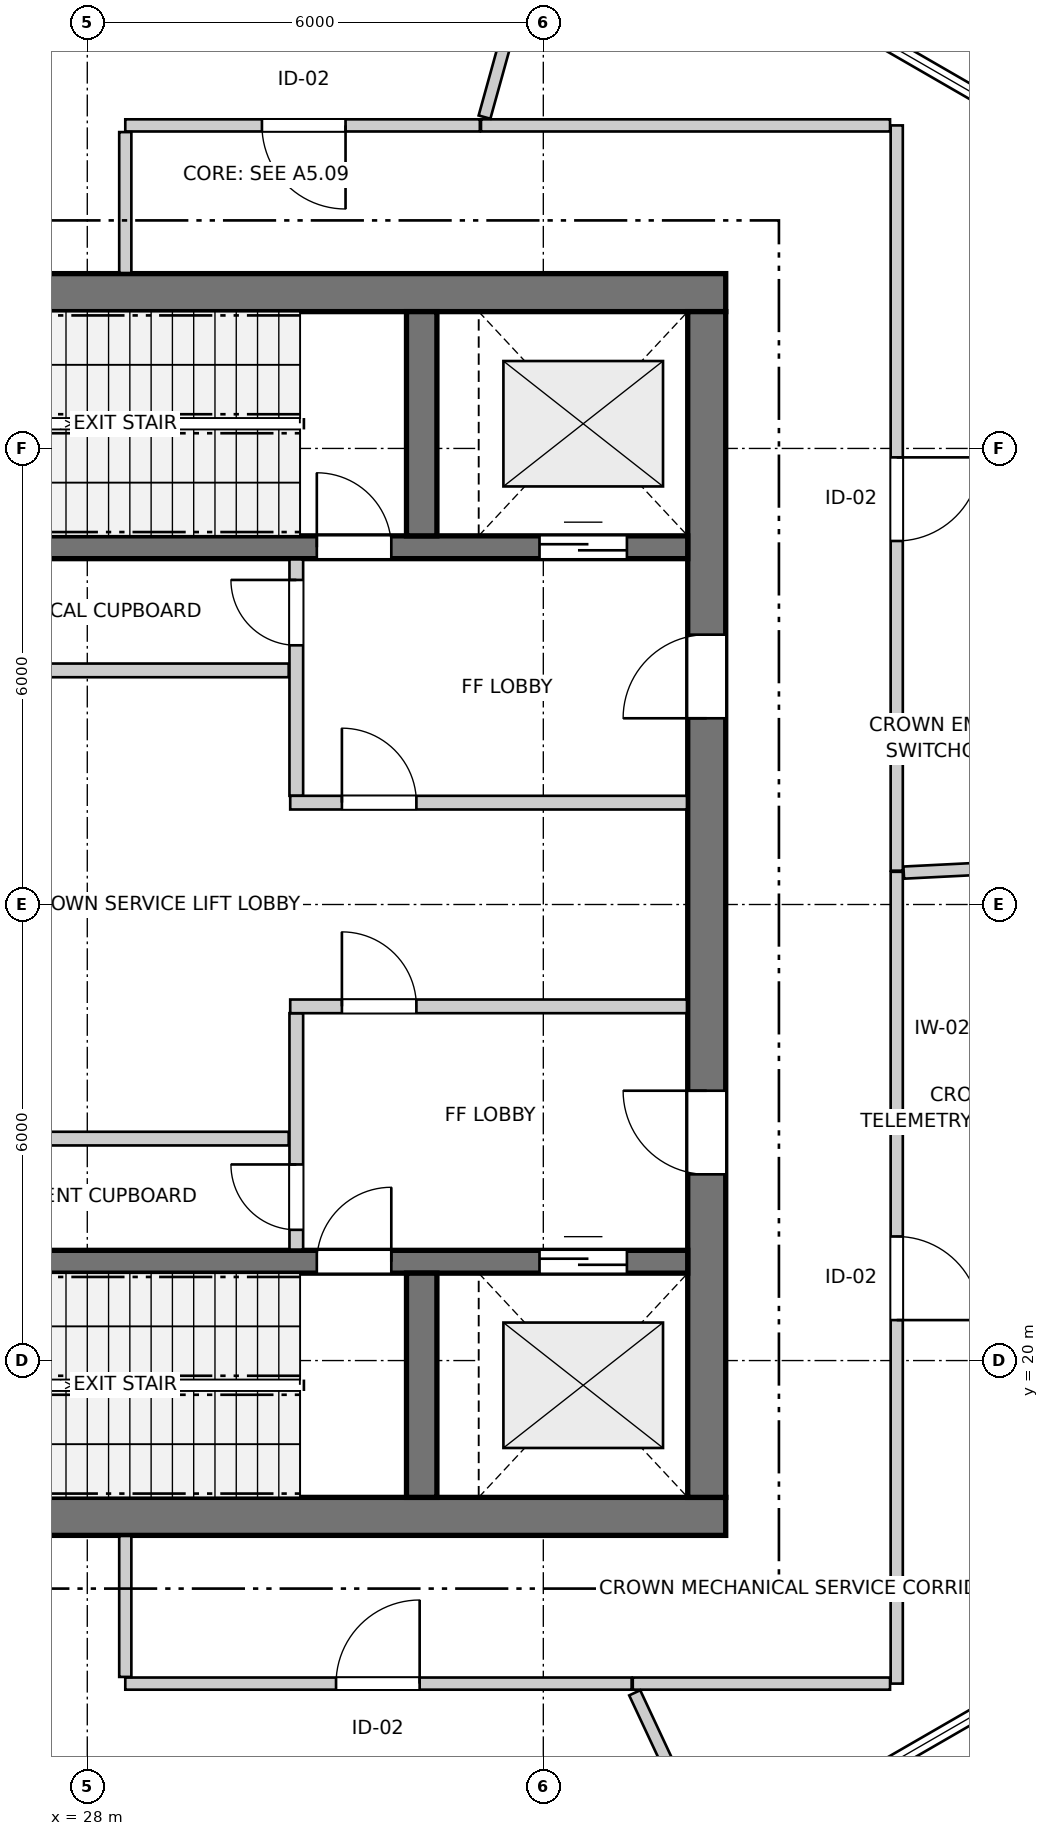
"""IFC4 building model, lengths in metres.
Left out: names, types, materials, properties, quantities, classifications, styles, units other than length and angle.
Written with IfcOpenShell. Run it as: python <this file> out.ifc"""

import sys

from ifc_helpers import new_model, si_unit, direction, frame, frame_2d, origin, place, context, subcontext, project, spatial, rectangle, extrude, source, transform, mapped, element, fill, save


model = new_model("IFC4")
c1 = context("Model", 3, precision=1e-05, world=origin(), true_north=direction((0.0, 1.0)))
c2 = subcontext(c1, "Body", "Model", "MODEL_VIEW")
j1 = project(units=[si_unit("LENGTHUNIT", "METRE"), si_unit("PLANEANGLEUNIT", "RADIAN")], contexts=[c1])
p1 = place(None, origin())
s1 = spatial("IfcSite", under=j1, at=p1, CompositionType="ELEMENT")
p2 = place(p1, origin())
s2 = spatial("IfcBuilding", under=s1, at=p2, CompositionType="ELEMENT")
p3 = place(p2, frame((0.0, 0.0, 270.4)))
s3 = spatial("IfcBuildingStorey", under=s2, at=p3, CompositionType="ELEMENT", Elevation=270.4)
for number, where, z_axis, x_axis in (
    (1, (24.3, 17.95, 0.0), (0.0, 0.0, 1.0), (1.0, 0.0, 0.0)),
    (2, (36.4, 34.05, 0.0), (0.0, 0.0, 1.0), (-1.0, 0.0, 0.0)),
):
    element("IfcWall", number, at=place(p3, frame(where, z_axis=z_axis, x_axis=x_axis)), inside=s3, PredefinedType="SHEAR", context=c2, shape_type="SweptSolid", body=[
        extrude(rectangle(XDim=12.1, YDim=0.5, at=frame_2d((6.05, 0.0))), origin(), (0.0, 0.0, 1.0), 4.05),
    ])
p4 = place(p3, frame((36.15, 18.2, 0.0), z_axis=(0.0, 0.0, 1.0), x_axis=(0.0, 1.0, 0.0)))
e3 = element("IfcWall", 3, at=p4, inside=s3, PredefinedType="SHEAR", context=c2, shape_type="SweptSolid", body=[
    extrude(rectangle(XDim=15.6, YDim=0.5, at=frame_2d((7.8, 0.0))), origin(), (0.0, 0.0, 1.0), 4.05),
])
p5 = place(p4, frame((4.25, 0.0, 0.0)))
e4 = element("IfcOpeningElement", 4, at=p5, cuts=e3, PredefinedType="OPENING", context=c2, shape_type="SweptSolid", body=[
    extrude(rectangle(XDim=1.1, YDim=2.15, at=frame_2d((0.55, 1.075))), frame((0.0, 0.26, 0.0), z_axis=(0.0, -1.0, 0.0), x_axis=(1.0, 0.0, 0.0)), (0.0, 0.0, 1.0), 0.52),
])
p6 = place(p4, frame((10.25, 0.0, 0.0)))
e5 = element("IfcOpeningElement", 5, at=p6, cuts=e3, PredefinedType="OPENING", context=c2, shape_type="SweptSolid", body=[
    extrude(rectangle(XDim=1.1, YDim=2.15, at=frame_2d((0.55, 1.075))), frame((0.0, 0.26, 0.0), z_axis=(0.0, -1.0, 0.0), x_axis=(1.0, 0.0, 0.0)), (0.0, 0.0, 1.0), 0.52),
])
p7 = place(p3, frame((24.8, 21.3, 0.0), z_axis=(0.0, 0.0, 1.0), x_axis=(1.0, 0.0, 0.0)))
e6 = element("IfcWall", 6, at=p7, inside=s3, PredefinedType="SHEAR", context=c2, shape_type="SweptSolid", body=[
    extrude(rectangle(XDim=11.1, YDim=0.3, at=frame_2d((5.55, 0.0))), origin(), (0.0, 0.0, 1.0), 4.05),
])
p8 = place(p7, frame((6.22, 0.0, 0.0)))
e7 = element("IfcOpeningElement", 7, at=p8, cuts=e6, PredefinedType="OPENING", context=c2, shape_type="SweptSolid", body=[
    extrude(rectangle(XDim=0.98, YDim=2.15, at=frame_2d((0.49, 1.075))), frame((0.0, 0.16, 0.0), z_axis=(0.0, -1.0, 0.0), x_axis=(1.0, 0.0, 0.0)), (0.0, 0.0, 1.0), 0.32),
])
p9 = place(p7, frame((9.15, 0.0, 0.0)))
e8 = element("IfcOpeningElement", 8, at=p9, cuts=e6, PredefinedType="OPENING", context=c2, shape_type="SweptSolid", body=[
    extrude(rectangle(XDim=1.15, YDim=2.15, at=frame_2d((0.575, 1.075))), frame((0.0, 0.16, 0.0), z_axis=(0.0, -1.0, 0.0), x_axis=(1.0, 0.0, 0.0)), (0.0, 0.0, 1.0), 0.32),
])
p10 = place(p3, frame((32.4, 18.2, 0.0), z_axis=(0.0, 0.0, 1.0), x_axis=(0.0, 1.0, 0.0)))
e9 = element("IfcWall", 9, at=p10, inside=s3, PredefinedType="SHEAR", context=c2, shape_type="SweptSolid", body=[
    extrude(rectangle(XDim=2.95, YDim=0.4, at=frame_2d((1.475, 0.0))), origin(), (0.0, 0.0, 1.0), 4.05),
])
p11 = place(p3, frame((24.8, 30.7, 0.0), z_axis=(0.0, 0.0, 1.0), x_axis=(1.0, 0.0, 0.0)))
e10 = element("IfcWall", 10, at=p11, inside=s3, PredefinedType="SHEAR", context=c2, shape_type="SweptSolid", body=[
    extrude(rectangle(XDim=11.1, YDim=0.3, at=frame_2d((5.55, 0.0))), origin(), (0.0, 0.0, 1.0), 4.05),
])
p12 = place(p11, frame((6.22, 0.0, 0.0)))
e11 = element("IfcOpeningElement", 11, at=p12, cuts=e10, PredefinedType="OPENING", context=c2, shape_type="SweptSolid", body=[
    extrude(rectangle(XDim=0.98, YDim=2.15, at=frame_2d((0.49, 1.075))), frame((0.0, 0.16, 0.0), z_axis=(0.0, -1.0, 0.0), x_axis=(1.0, 0.0, 0.0)), (0.0, 0.0, 1.0), 0.32),
])
p13 = place(p11, frame((9.15, 0.0, 0.0)))
e12 = element("IfcOpeningElement", 12, at=p13, cuts=e10, PredefinedType="OPENING", context=c2, shape_type="SweptSolid", body=[
    extrude(rectangle(XDim=1.15, YDim=2.15, at=frame_2d((0.575, 1.075))), frame((0.0, 0.16, 0.0), z_axis=(0.0, -1.0, 0.0), x_axis=(1.0, 0.0, 0.0)), (0.0, 0.0, 1.0), 0.32),
])
p14 = place(p3, frame((32.4, 30.85, 0.0), z_axis=(0.0, 0.0, 1.0), x_axis=(0.0, 1.0, 0.0)))
e13 = element("IfcWall", 13, at=p14, inside=s3, PredefinedType="SHEAR", context=c2, shape_type="SweptSolid", body=[
    extrude(rectangle(XDim=2.95, YDim=0.4, at=frame_2d((1.475, 0.0))), origin(), (0.0, 0.0, 1.0), 4.05),
])
p15 = place(p3, frame((30.75, 21.46, 0.0), z_axis=(0.0, 0.0, 1.0), x_axis=(0.0, 1.0, 0.0)))
e14 = element("IfcWall", 14, at=p15, inside=s3, PredefinedType="PARTITIONING", context=c2, shape_type="SweptSolid", body=[
    extrude(rectangle(XDim=3.11, YDim=0.18, at=frame_2d((1.555, 0.0))), origin(), (0.0, 0.0, 1.0), 4.05),
])
p16 = place(p15, frame((0.26, 0.0, 0.0)))
e15 = element("IfcOpeningElement", 15, at=p16, cuts=e14, PredefinedType="OPENING", context=c2, shape_type="SweptSolid", body=[
    extrude(rectangle(XDim=0.86, YDim=2.05, at=frame_2d((0.43, 1.025))), frame((0.0, 0.1, 0.0), z_axis=(0.0, -1.0, 0.0), x_axis=(1.0, 0.0, 0.0)), (0.0, 0.0, 1.0), 0.2),
])
p17 = place(p3, frame((30.67, 24.66, 0.0), z_axis=(0.0, 0.0, 1.0), x_axis=(1.0, 0.0, 0.0)))
e16 = element("IfcWall", 16, at=p17, inside=s3, PredefinedType="PARTITIONING", context=c2, shape_type="SweptSolid", body=[
    extrude(rectangle(XDim=5.22, YDim=0.18, at=frame_2d((2.61, 0.0))), origin(), (0.0, 0.0, 1.0), 4.05),
])
p18 = place(p17, frame((0.68, 0.0, 0.0)))
e17 = element("IfcOpeningElement", 17, at=p18, cuts=e16, PredefinedType="OPENING", context=c2, shape_type="SweptSolid", body=[
    extrude(rectangle(XDim=0.98, YDim=2.15, at=frame_2d((0.49, 1.075))), frame((0.0, 0.1, 0.0), z_axis=(0.0, -1.0, 0.0), x_axis=(1.0, 0.0, 0.0)), (0.0, 0.0, 1.0), 0.2),
])
p19 = place(p3, frame((30.75, 27.43, 0.0), z_axis=(0.0, 0.0, 1.0), x_axis=(0.0, 1.0, 0.0)))
e18 = element("IfcWall", 18, at=p19, inside=s3, PredefinedType="PARTITIONING", context=c2, shape_type="SweptSolid", body=[
    extrude(rectangle(XDim=3.11, YDim=0.18, at=frame_2d((1.555, 0.0))), origin(), (0.0, 0.0, 1.0), 4.05),
])
p20 = place(p19, frame((1.98, 0.0, 0.0)))
e19 = element("IfcOpeningElement", 19, at=p20, cuts=e18, PredefinedType="OPENING", context=c2, shape_type="SweptSolid", body=[
    extrude(rectangle(XDim=0.86, YDim=2.05, at=frame_2d((0.43, 1.025))), frame((0.0, 0.1, 0.0), z_axis=(0.0, -1.0, 0.0), x_axis=(1.0, 0.0, 0.0)), (0.0, 0.0, 1.0), 0.2),
])
p21 = place(p3, frame((30.67, 27.34, 0.0), z_axis=(0.0, 0.0, 1.0), x_axis=(1.0, 0.0, 0.0)))
e20 = element("IfcWall", 20, at=p21, inside=s3, PredefinedType="PARTITIONING", context=c2, shape_type="SweptSolid", body=[
    extrude(rectangle(XDim=5.22, YDim=0.18, at=frame_2d((2.61, 0.0))), origin(), (0.0, 0.0, 1.0), 4.05),
])
p22 = place(p21, frame((0.68, 0.0, 0.0)))
e21 = element("IfcOpeningElement", 21, at=p22, cuts=e20, PredefinedType="OPENING", context=c2, shape_type="SweptSolid", body=[
    extrude(rectangle(XDim=0.98, YDim=2.15, at=frame_2d((0.49, 1.075))), frame((0.0, 0.1, 0.0), z_axis=(0.0, -1.0, 0.0), x_axis=(1.0, 0.0, 0.0)), (0.0, 0.0, 1.0), 0.2),
])
for number, where, z_axis, x_axis in (
    (22, (24.81, 22.92, 0.0), (0.0, 0.0, 1.0), (1.0, 0.0, 0.0)),
    (23, (24.81, 29.08, 0.0), (0.0, 0.0, 1.0), (1.0, 0.0, 0.0)),
):
    element("IfcWall", number, at=place(p3, frame(where, z_axis=z_axis, x_axis=x_axis)), inside=s3, PredefinedType="PARTITIONING", context=c2, shape_type="SweptSolid", body=[
        extrude(rectangle(XDim=5.84, YDim=0.18, at=frame_2d((2.92, 0.0))), origin(), (0.0, 0.0, 1.0), 4.05),
    ])
p23 = place(p3, frame((38.65, 26.43, 0.0), z_axis=(0.0, 0.0, 1.0), x_axis=(0.0, -1.0, 0.0)))
e24 = element("IfcWall", 24, at=p23, inside=s3, PredefinedType="PARTITIONING", context=c2, shape_type="SweptSolid", body=[
    extrude(rectangle(XDim=10.68, YDim=0.16, at=frame_2d((5.34, 0.0))), origin(), (0.0, 0.0, 1.0), 4.05),
])
p24 = place(p23, frame((4.798, 0.0, 0.0)))
e25 = element("IfcOpeningElement", 25, at=p24, cuts=e24, PredefinedType="OPENING", context=c2, shape_type="SweptSolid", body=[
    extrude(rectangle(XDim=1.1, YDim=2.15, at=frame_2d((0.55, 1.075))), frame((0.0, 0.09, 0.0), z_axis=(0.0, -1.0, 0.0), x_axis=(1.0, 0.0, 0.0)), (0.0, 0.0, 1.0), 0.18),
])
p25 = place(p3, frame((38.65, 36.25, 0.0), z_axis=(0.0, 0.0, 1.0), x_axis=(0.0, -1.0, 0.0)))
e26 = element("IfcWall", 26, at=p25, inside=s3, PredefinedType="PARTITIONING", context=c2, shape_type="SweptSolid", body=[
    extrude(rectangle(XDim=9.805, YDim=0.16, at=frame_2d((4.902, 0.0))), origin(), (0.0, 0.0, 1.0), 4.05),
])
p26 = place(p25, frame((4.367, 0.0, 0.0)))
e27 = element("IfcOpeningElement", 27, at=p26, cuts=e26, PredefinedType="OPENING", context=c2, shape_type="SweptSolid", body=[
    extrude(rectangle(XDim=1.1, YDim=2.15, at=frame_2d((0.55, 1.075))), frame((0.0, 0.09, 0.0), z_axis=(0.0, -1.0, 0.0), x_axis=(1.0, 0.0, 0.0)), (0.0, 0.0, 1.0), 0.18),
])
p27 = place(p3, frame((28.5, 15.75, 0.0), z_axis=(0.0, 0.0, 1.0), x_axis=(1.0, 0.0, 0.0)))
e28 = element("IfcWall", 28, at=p27, inside=s3, PredefinedType="PARTITIONING", context=c2, shape_type="SweptSolid", body=[
    extrude(rectangle(XDim=6.662, YDim=0.16, at=frame_2d((3.331, 0.0))), origin(), (0.0, 0.0, 1.0), 4.05),
])
p28 = place(p27, frame((2.773, 0.0, 0.0)))
e29 = element("IfcOpeningElement", 29, at=p28, cuts=e28, PredefinedType="OPENING", context=c2, shape_type="SweptSolid", body=[
    extrude(rectangle(XDim=1.1, YDim=2.15, at=frame_2d((0.55, 1.075))), frame((0.0, 0.09, 0.0), z_axis=(0.0, -1.0, 0.0), x_axis=(1.0, 0.0, 0.0)), (0.0, 0.0, 1.0), 0.18),
])
p29 = place(p3, frame((33.165, 36.25, 0.0), z_axis=(0.0, 0.0, 1.0), x_axis=(-1.0, 0.0, 0.0)))
e30 = element("IfcWall", 30, at=p29, inside=s3, PredefinedType="PARTITIONING", context=c2, shape_type="SweptSolid", body=[
    extrude(rectangle(XDim=4.665, YDim=0.16, at=frame_2d((2.333, 0.0))), origin(), (0.0, 0.0, 1.0), 4.05),
])
p30 = place(p29, frame((1.767, 0.0, 0.0)))
e31 = element("IfcOpeningElement", 31, at=p30, cuts=e30, PredefinedType="OPENING", context=c2, shape_type="SweptSolid", body=[
    extrude(rectangle(XDim=1.1, YDim=2.15, at=frame_2d((0.55, 1.075))), frame((0.0, 0.09, 0.0), z_axis=(0.0, -1.0, 0.0), x_axis=(1.0, 0.0, 0.0)), (0.0, 0.0, 1.0), 0.18),
])
p31 = place(p3, frame((33.18, 36.25, 0.0), z_axis=(0.0, 0.0, 1.0), x_axis=(1.0, 0.0, 0.0)))
e32 = element("IfcWall", 32, at=p31, inside=s3, PredefinedType="PARTITIONING", context=c2, shape_type="SweptSolid", body=[
    extrude(rectangle(XDim=5.382, YDim=0.16, at=frame_2d((2.691, 0.0))), origin(), (0.0, 0.0, 1.0), 4.05),
])
p32 = place(p3, frame((33.226, 36.359, 0.0), z_axis=(0.0, 0.0, 1.0), x_axis=(0.267305613855, 0.963611803997, 0.0)))
e33 = element("IfcWall", 33, at=p32, inside=s3, PredefinedType="PARTITIONING", context=c2, shape_type="SweptSolid", body=[
    extrude(rectangle(XDim=3.574, YDim=0.16, at=frame_2d((1.787, 0.0))), origin(), (0.0, 0.0, 1.0), 3.318),
])
p33 = place(p3, frame((35.177, 15.75, 0.0), z_axis=(0.0, 0.0, 1.0), x_axis=(1.0, 0.0, 0.0)))
e34 = element("IfcWall", 34, at=p33, inside=s3, PredefinedType="PARTITIONING", context=c2, shape_type="SweptSolid", body=[
    extrude(rectangle(XDim=3.385, YDim=0.16, at=frame_2d((1.692, 0.0))), origin(), (0.0, 0.0, 1.0), 4.05),
])
p34 = place(p3, frame((38.742, 26.42, 0.0), z_axis=(0.0, 0.0, 1.0), x_axis=(0.998740431648, 0.050175194976, 0.0)))
e35 = element("IfcWall", 35, at=p34, inside=s3, PredefinedType="PARTITIONING", context=c2, shape_type="SweptSolid", body=[
    extrude(rectangle(XDim=3.075, YDim=0.16, at=frame_2d((1.538, 0.0))), origin(), (0.0, 0.0, 1.0), 4.05),
])
p35 = place(p3, frame((35.203, 15.629, 0.0), z_axis=(0.0, 0.0, 1.0), x_axis=(0.423577860937, -0.905859699801, 0.0)))
e36 = element("IfcWall", 36, at=p35, inside=s3, PredefinedType="PARTITIONING", context=c2, shape_type="SweptSolid", body=[
    extrude(rectangle(XDim=2.47, YDim=0.16, at=frame_2d((1.235, 0.0))), origin(), (0.0, 0.0, 1.0), 4.05),
])
for number, where, z_axis, x_axis in (
    (37, (28.5, 34.308, 0.0), (0.0, 0.0, 1.0), (0.0, 1.0, 0.0)),
    (38, (28.5, 15.838, 0.0), (0.0, 0.0, 1.0), (0.0, 1.0, 0.0)),
):
    element("IfcWall", number, at=place(p3, frame(where, z_axis=z_axis, x_axis=x_axis)), inside=s3, PredefinedType="PARTITIONING", context=c2, shape_type="SweptSolid", body=[
        extrude(rectangle(XDim=1.854, YDim=0.16, at=frame_2d((0.927, 0.0))), origin(), (0.0, 0.0, 1.0), 3.318),
    ])
m1 = source(origin(), c2, "Body", "SweptSolid", [
    extrude(rectangle(XDim=0.98, YDim=2.15, at=frame_2d((0.49, 1.075))), frame((0.0, 0.025, 0.0), z_axis=(0.0, -1.0, 0.0), x_axis=(1.0, 0.0, 0.0)), (0.0, 0.0, 1.0), 0.05),
])
p36 = place(p8, origin())
e39 = element("IfcDoor", 39, at=p36, inside=s3, OperationType="SINGLE_SWING_RIGHT", PredefinedType="DOOR", context=c2, shape_type="MappedRepresentation", body=[
    mapped(m1, transform((0.0, 0.0, 0.0), x_axis=(1.0, 0.0, 0.0), y_axis=(0.0, 1.0, 0.0), z_axis=(0.0, 0.0, 1.0), scale=1.0)),
])
fill(e7, e39)
m2 = source(origin(), c2, "Body", "SweptSolid", [
    extrude(rectangle(XDim=1.15, YDim=2.15, at=frame_2d((0.575, 1.075))), frame((0.0, 0.025, 0.0), z_axis=(0.0, -1.0, 0.0), x_axis=(1.0, 0.0, 0.0)), (0.0, 0.0, 1.0), 0.05),
])
p37 = place(p9, origin())
e40 = element("IfcDoor", 40, at=p37, inside=s3, OperationType="DOUBLE_DOOR_SLIDING", PredefinedType="DOOR", context=c2, shape_type="MappedRepresentation", body=[
    mapped(m2, transform((0.0, 0.0, 0.0), x_axis=(1.0, 0.0, 0.0), y_axis=(0.0, 1.0, 0.0), z_axis=(0.0, 0.0, 1.0), scale=1.0)),
])
fill(e8, e40)
p38 = place(p12, origin())
e41 = element("IfcDoor", 41, at=p38, inside=s3, OperationType="SINGLE_SWING_LEFT", PredefinedType="DOOR", context=c2, shape_type="MappedRepresentation", body=[
    mapped(m1, transform((0.0, 0.0, 0.0), x_axis=(1.0, 0.0, 0.0), y_axis=(0.0, 1.0, 0.0), z_axis=(0.0, 0.0, 1.0), scale=1.0)),
])
fill(e11, e41)
p39 = place(p13, origin())
e42 = element("IfcDoor", 42, at=p39, inside=s3, OperationType="DOUBLE_DOOR_SLIDING", PredefinedType="DOOR", context=c2, shape_type="MappedRepresentation", body=[
    mapped(m2, transform((0.0, 0.0, 0.0), x_axis=(1.0, 0.0, 0.0), y_axis=(0.0, 1.0, 0.0), z_axis=(0.0, 0.0, 1.0), scale=1.0)),
])
fill(e12, e42)
m3 = source(origin(), c2, "Body", "SweptSolid", [
    extrude(rectangle(XDim=1.1, YDim=2.15, at=frame_2d((0.55, 1.075))), frame((0.0, 0.025, 0.0), z_axis=(0.0, -1.0, 0.0), x_axis=(1.0, 0.0, 0.0)), (0.0, 0.0, 1.0), 0.05),
])
p40 = place(p5, origin())
e43 = element("IfcDoor", 43, at=p40, inside=s3, OperationType="SINGLE_SWING_RIGHT", PredefinedType="DOOR", context=c2, shape_type="MappedRepresentation", body=[
    mapped(m3, transform((0.0, 0.0, 0.0), x_axis=(1.0, 0.0, 0.0), y_axis=(0.0, 1.0, 0.0), z_axis=(0.0, 0.0, 1.0), scale=1.0)),
])
fill(e4, e43)
p41 = place(p6, origin())
e44 = element("IfcDoor", 44, at=p41, inside=s3, OperationType="SINGLE_SWING_LEFT", PredefinedType="DOOR", context=c2, shape_type="MappedRepresentation", body=[
    mapped(m3, transform((0.0, 0.0, 0.0), x_axis=(1.0, 0.0, 0.0), y_axis=(0.0, 1.0, 0.0), z_axis=(0.0, 0.0, 1.0), scale=1.0)),
])
fill(e5, e44)
m4 = source(origin(), c2, "Body", "SweptSolid", [
    extrude(rectangle(XDim=0.86, YDim=2.05, at=frame_2d((0.43, 1.025))), frame((0.0, 0.025, 0.0), z_axis=(0.0, -1.0, 0.0), x_axis=(1.0, 0.0, 0.0)), (0.0, 0.0, 1.0), 0.05),
])
p42 = place(p16, origin())
e45 = element("IfcDoor", 45, at=p42, inside=s3, OperationType="SINGLE_SWING_RIGHT", PredefinedType="DOOR", context=c2, shape_type="MappedRepresentation", body=[
    mapped(m4, transform((0.0, 0.0, 0.0), x_axis=(1.0, 0.0, 0.0), y_axis=(0.0, 1.0, 0.0), z_axis=(0.0, 0.0, 1.0), scale=1.0)),
])
fill(e15, e45)
p43 = place(p18, origin())
e46 = element("IfcDoor", 46, at=p43, inside=s3, OperationType="SINGLE_SWING_LEFT", PredefinedType="DOOR", context=c2, shape_type="MappedRepresentation", body=[
    mapped(m1, transform((0.0, 0.0, 0.0), x_axis=(1.0, 0.0, 0.0), y_axis=(0.0, 1.0, 0.0), z_axis=(0.0, 0.0, 1.0), scale=1.0)),
])
fill(e17, e46)
p44 = place(p20, origin())
e47 = element("IfcDoor", 47, at=p44, inside=s3, OperationType="SINGLE_SWING_RIGHT", PredefinedType="DOOR", context=c2, shape_type="MappedRepresentation", body=[
    mapped(m4, transform((0.0, 0.0, 0.0), x_axis=(1.0, 0.0, 0.0), y_axis=(0.0, 1.0, 0.0), z_axis=(0.0, 0.0, 1.0), scale=1.0)),
])
fill(e19, e47)
p45 = place(p22, origin())
e48 = element("IfcDoor", 48, at=p45, inside=s3, OperationType="SINGLE_SWING_LEFT", PredefinedType="DOOR", context=c2, shape_type="MappedRepresentation", body=[
    mapped(m1, transform((0.0, 0.0, 0.0), x_axis=(1.0, 0.0, 0.0), y_axis=(0.0, 1.0, 0.0), z_axis=(0.0, 0.0, 1.0), scale=1.0)),
])
fill(e21, e48)
p46 = place(p24, origin())
e49 = element("IfcDoor", 49, at=p46, inside=s3, OperationType="SINGLE_SWING_RIGHT", PredefinedType="DOOR", context=c2, shape_type="MappedRepresentation", body=[
    mapped(m3, transform((0.0, 0.0, 0.0), x_axis=(1.0, 0.0, 0.0), y_axis=(0.0, 1.0, 0.0), z_axis=(0.0, 0.0, 1.0), scale=1.0)),
])
fill(e25, e49)
p47 = place(p26, origin())
e50 = element("IfcDoor", 50, at=p47, inside=s3, OperationType="SINGLE_SWING_LEFT", PredefinedType="DOOR", context=c2, shape_type="MappedRepresentation", body=[
    mapped(m3, transform((0.0, 0.0, 0.0), x_axis=(1.0, 0.0, 0.0), y_axis=(0.0, 1.0, 0.0), z_axis=(0.0, 0.0, 1.0), scale=1.0)),
])
fill(e27, e50)
p48 = place(p28, origin())
e51 = element("IfcDoor", 51, at=p48, inside=s3, OperationType="SINGLE_SWING_RIGHT", PredefinedType="DOOR", context=c2, shape_type="MappedRepresentation", body=[
    mapped(m3, transform((0.0, 0.0, 0.0), x_axis=(1.0, 0.0, 0.0), y_axis=(0.0, 1.0, 0.0), z_axis=(0.0, 0.0, 1.0), scale=1.0)),
])
fill(e29, e51)
p49 = place(p30, origin())
e52 = element("IfcDoor", 52, at=p49, inside=s3, OperationType="SINGLE_SWING_LEFT", PredefinedType="DOOR", context=c2, shape_type="MappedRepresentation", body=[
    mapped(m3, transform((0.0, 0.0, 0.0), x_axis=(1.0, 0.0, 0.0), y_axis=(0.0, 1.0, 0.0), z_axis=(0.0, 0.0, 1.0), scale=1.0)),
])
fill(e31, e52)
save(model, sys.argv[1])
